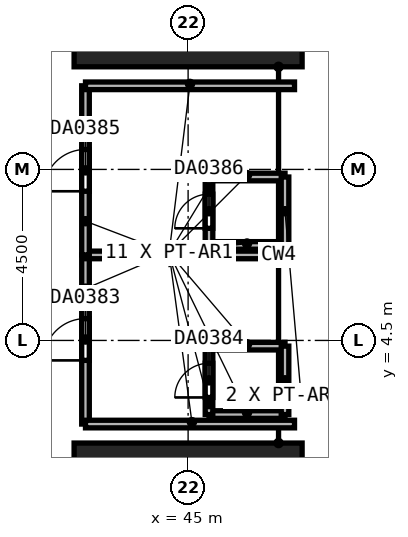
"""IFC4 building model, lengths in metres.
Left out: names, types, materials, properties, quantities, classifications, styles, units other than length and angle.
Written with IfcOpenShell. Run it as: python <this file> out.ifc"""

import sys

from ifc_helpers import new_model, si_unit, direction, frame, frame_2d, origin, origin_2d, place, context, subcontext, project, spatial, rectangle, extrude, element, fill, save


model = new_model("IFC4")
c1 = context("Model", 3, precision=1e-05, world=origin(), true_north=direction((0.0, 1.0)))
c2 = subcontext(c1, "Body", "Model", "MODEL_VIEW")
j1 = project(units=[si_unit("LENGTHUNIT", "METRE"), si_unit("PLANEANGLEUNIT", "RADIAN")], contexts=[c1])
p1 = place(None, origin())
s1 = spatial("IfcSite", under=j1, at=p1, CompositionType="ELEMENT")
p2 = place(p1, origin())
s2 = spatial("IfcBuilding", under=s1, at=p2, CompositionType="ELEMENT")
p3 = place(p2, frame((0.0, 0.0, 25.0)))
s3 = spatial("IfcBuildingStorey", under=s2, at=p3, CompositionType="ELEMENT", Elevation=25.0)
for number, where, z_axis, x_axis in (
    (1, (45.0, 0.0, 0.0), (0.0, 0.0, 1.0), (0.0, 1.0, 0.0)),
    (2, (45.0, 13.5, 0.0), (0.0, 0.0, 1.0), (0.0, 1.0, 0.0)),
):
    element("IfcColumn", number, at=place(p3, frame(where, z_axis=z_axis, x_axis=x_axis)), inside=s3, PredefinedType="COLUMN", context=c2, shape_type="SweptSolid", body=[
        extrude(rectangle(XDim=3.6, YDim=6.0, at=origin_2d()), origin(), (0.0, 0.0, 1.0), 6.0),
    ])
p4 = place(p3, frame((42.3, 2.3, 0.0), z_axis=(0.0, 0.0, 1.0), x_axis=(0.0, 1.0, 0.0)))
e3 = element("IfcWall", 3, at=p4, inside=s3, PredefinedType="PARTITIONING", context=c2, shape_type="SweptSolid", body=[
    extrude(rectangle(XDim=4.45, YDim=0.2, at=frame_2d((2.225, 0.0))), origin(), (0.0, 0.0, 1.0), 5.7),
])
p5 = place(p4, frame((1.675, 0.0, 0.0)))
e4 = element("IfcOpeningElement", 4, at=p5, cuts=e3, PredefinedType="OPENING", context=c2, shape_type="SweptSolid", body=[
    extrude(rectangle(XDim=1.1, YDim=2.4, at=frame_2d((0.55, 1.2))), frame((0.0, 0.1, 0.0), z_axis=(0.0, -1.0, 0.0), x_axis=(1.0, 0.0, 0.0)), (0.0, 0.0, 1.0), 0.2),
])
for number, where, z_axis, x_axis in (
    (5, (42.3, 2.3, 0.0), (0.0, 0.0, 1.0), (1.0, 0.0, 0.0)),
    (6, (42.3, 6.75, 0.0), (0.0, 0.0, 1.0), (1.0, 0.0, 0.0)),
):
    element("IfcWall", number, at=place(p3, frame(where, z_axis=z_axis, x_axis=x_axis)), inside=s3, PredefinedType="PARTITIONING", context=c2, shape_type="SweptSolid", body=[
        extrude(rectangle(XDim=5.5, YDim=0.2, at=frame_2d((2.75, 0.0))), origin(), (0.0, 0.0, 1.0), 5.7),
    ])
for number, where, z_axis, x_axis in (
    (7, (45.55, 2.55, 0.0), (0.0, 0.0, 1.0), (1.0, 0.0, 0.0)),
    (8, (47.55, 4.35, 0.0), (0.0, 0.0, 1.0), (-1.0, 0.0, 0.0)),
):
    element("IfcWall", number, at=place(p3, frame(where, z_axis=z_axis, x_axis=x_axis)), inside=s3, PredefinedType="PARTITIONING", context=c2, shape_type="SweptSolid", body=[
        extrude(rectangle(XDim=2.0, YDim=0.2, at=frame_2d((1.0, 0.0))), origin(), (0.0, 0.0, 1.0), 5.7),
    ])
p6 = place(p3, frame((47.55, 2.55, 0.0), z_axis=(0.0, 0.0, 1.0), x_axis=(0.0, 1.0, 0.0)))
e9 = element("IfcWall", 9, at=p6, inside=s3, PredefinedType="PARTITIONING", context=c2, shape_type="SweptSolid", body=[
    extrude(rectangle(XDim=1.8, YDim=0.2, at=frame_2d((0.9, 0.0))), origin(), (0.0, 0.0, 1.0), 4.5),
])
p7 = place(p3, frame((45.55, 2.55, 0.0), z_axis=(0.0, 0.0, 1.0), x_axis=(0.0, 1.0, 0.0)))
e10 = element("IfcWall", 10, at=p7, inside=s3, PredefinedType="PARTITIONING", context=c2, shape_type="SweptSolid", body=[
    extrude(rectangle(XDim=1.8, YDim=0.2, at=frame_2d((0.9, 0.0))), origin(), (0.0, 0.0, 1.0), 5.7),
])
p8 = place(p7, frame((0.45, 0.0, 0.0)))
e11 = element("IfcOpeningElement", 11, at=p8, cuts=e10, PredefinedType="OPENING", context=c2, shape_type="SweptSolid", body=[
    extrude(rectangle(XDim=0.9, YDim=2.1, at=frame_2d((0.45, 1.05))), frame((0.0, 0.1, 0.0), z_axis=(0.0, -1.0, 0.0), x_axis=(1.0, 0.0, 0.0)), (0.0, 0.0, 1.0), 0.2),
])
p9 = place(p3, frame((42.3, 6.75, 0.0), z_axis=(0.0, 0.0, 1.0), x_axis=(0.0, 1.0, 0.0)))
e12 = element("IfcWall", 12, at=p9, inside=s3, PredefinedType="PARTITIONING", context=c2, shape_type="SweptSolid", body=[
    extrude(rectangle(XDim=4.45, YDim=0.2, at=frame_2d((2.225, 0.0))), origin(), (0.0, 0.0, 1.0), 5.7),
])
p10 = place(p9, frame((1.675, 0.0, 0.0)))
e13 = element("IfcOpeningElement", 13, at=p10, cuts=e12, PredefinedType="OPENING", context=c2, shape_type="SweptSolid", body=[
    extrude(rectangle(XDim=1.1, YDim=2.4, at=frame_2d((0.55, 1.2))), frame((0.0, 0.1, 0.0), z_axis=(0.0, -1.0, 0.0), x_axis=(1.0, 0.0, 0.0)), (0.0, 0.0, 1.0), 0.2),
])
p11 = place(p3, frame((42.3, 11.2, 0.0), z_axis=(0.0, 0.0, 1.0), x_axis=(1.0, 0.0, 0.0)))
e14 = element("IfcWall", 14, at=p11, inside=s3, PredefinedType="PARTITIONING", context=c2, shape_type="SweptSolid", body=[
    extrude(rectangle(XDim=5.5, YDim=0.2, at=frame_2d((2.75, 0.0))), origin(), (0.0, 0.0, 1.0), 5.7),
])
for number, where, z_axis, x_axis in (
    (15, (45.55, 7.0, 0.0), (0.0, 0.0, 1.0), (1.0, 0.0, 0.0)),
    (16, (47.55, 8.8, 0.0), (0.0, 0.0, 1.0), (-1.0, 0.0, 0.0)),
):
    element("IfcWall", number, at=place(p3, frame(where, z_axis=z_axis, x_axis=x_axis)), inside=s3, PredefinedType="PARTITIONING", context=c2, shape_type="SweptSolid", body=[
        extrude(rectangle(XDim=2.0, YDim=0.2, at=frame_2d((1.0, 0.0))), origin(), (0.0, 0.0, 1.0), 5.7),
    ])
p12 = place(p3, frame((47.55, 7.0, 0.0), z_axis=(0.0, 0.0, 1.0), x_axis=(0.0, 1.0, 0.0)))
e17 = element("IfcWall", 17, at=p12, inside=s3, PredefinedType="PARTITIONING", context=c2, shape_type="SweptSolid", body=[
    extrude(rectangle(XDim=1.8, YDim=0.2, at=frame_2d((0.9, 0.0))), origin(), (0.0, 0.0, 1.0), 4.5),
])
p13 = place(p3, frame((45.55, 7.0, 0.0), z_axis=(0.0, 0.0, 1.0), x_axis=(0.0, 1.0, 0.0)))
e18 = element("IfcWall", 18, at=p13, inside=s3, PredefinedType="PARTITIONING", context=c2, shape_type="SweptSolid", body=[
    extrude(rectangle(XDim=1.8, YDim=0.2, at=frame_2d((0.9, 0.0))), origin(), (0.0, 0.0, 1.0), 5.7),
])
p14 = place(p13, frame((0.45, 0.0, 0.0)))
e19 = element("IfcOpeningElement", 19, at=p14, cuts=e18, PredefinedType="OPENING", context=c2, shape_type="SweptSolid", body=[
    extrude(rectangle(XDim=0.9, YDim=2.1, at=frame_2d((0.45, 1.05))), frame((0.0, 0.1, 0.0), z_axis=(0.0, -1.0, 0.0), x_axis=(1.0, 0.0, 0.0)), (0.0, 0.0, 1.0), 0.2),
])
p15 = place(p5, origin())
e20 = element("IfcDoor", 20, at=p15, inside=s3, OperationType="DOUBLE_DOOR_SINGLE_SWING", PredefinedType="DOOR", context=c2, shape_type="SweptSolid", body=[
    extrude(rectangle(XDim=1.1, YDim=2.4, at=frame_2d((0.55, 1.2))), frame((0.0, 0.025, 0.0), z_axis=(0.0, -1.0, 0.0), x_axis=(1.0, 0.0, 0.0)), (0.0, 0.0, 1.0), 0.05),
])
fill(e4, e20)
p16 = place(p8, origin())
e21 = element("IfcDoor", 21, at=p16, inside=s3, OperationType="SINGLE_SWING_LEFT", PredefinedType="DOOR", context=c2, shape_type="SweptSolid", body=[
    extrude(rectangle(XDim=0.9, YDim=2.1, at=frame_2d((0.45, 1.05))), frame((0.0, 0.025, 0.0), z_axis=(0.0, -1.0, 0.0), x_axis=(1.0, 0.0, 0.0)), (0.0, 0.0, 1.0), 0.05),
])
fill(e11, e21)
p17 = place(p10, origin())
e22 = element("IfcDoor", 22, at=p17, inside=s3, OperationType="DOUBLE_DOOR_SINGLE_SWING", PredefinedType="DOOR", context=c2, shape_type="SweptSolid", body=[
    extrude(rectangle(XDim=1.1, YDim=2.4, at=frame_2d((0.55, 1.2))), frame((0.0, 0.025, 0.0), z_axis=(0.0, -1.0, 0.0), x_axis=(1.0, 0.0, 0.0)), (0.0, 0.0, 1.0), 0.05),
])
fill(e13, e22)
p18 = place(p14, origin())
e23 = element("IfcDoor", 23, at=p18, inside=s3, OperationType="SINGLE_SWING_LEFT", PredefinedType="DOOR", context=c2, shape_type="SweptSolid", body=[
    extrude(rectangle(XDim=0.9, YDim=2.1, at=frame_2d((0.45, 1.05))), frame((0.0, 0.025, 0.0), z_axis=(0.0, -1.0, 0.0), x_axis=(1.0, 0.0, 0.0)), (0.0, 0.0, 1.0), 0.05),
])
fill(e19, e23)
save(model, sys.argv[1])
